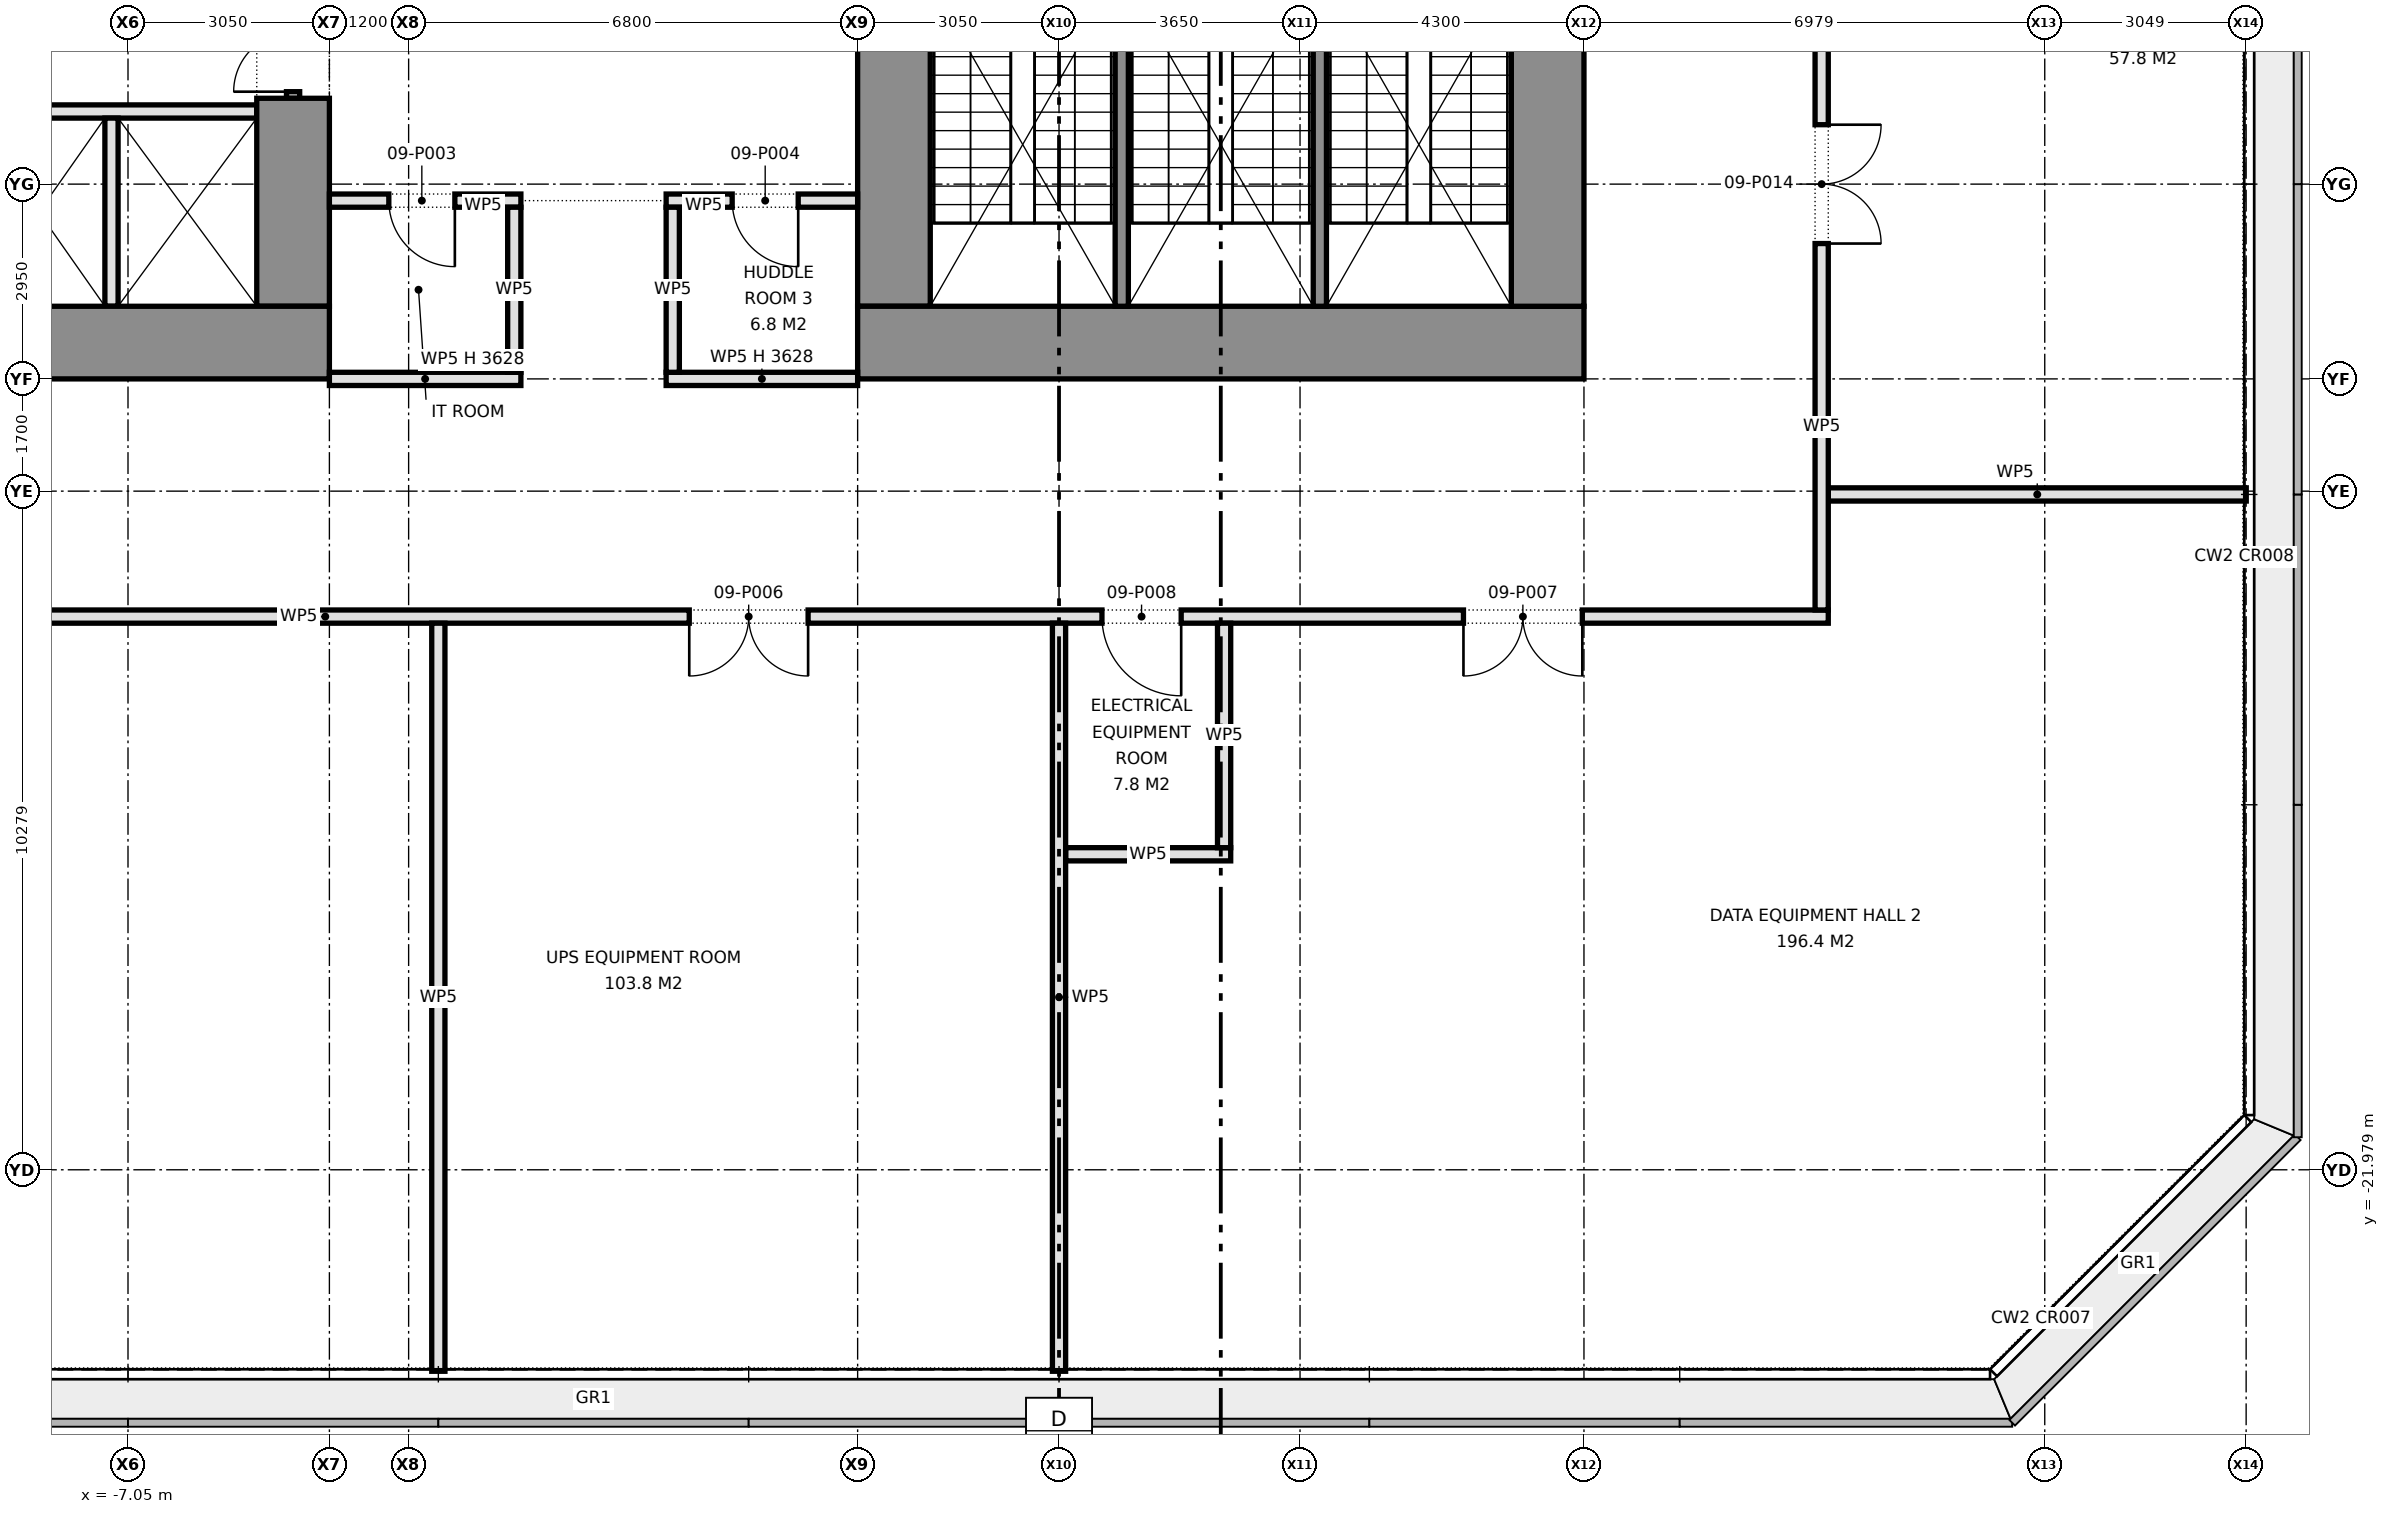
"""IFC4 building model, lengths in metres.
Left out: names, types, materials, properties, quantities, classifications, styles, units other than length and angle.
Written with IfcOpenShell. Run it as: python <this file> out.ifc"""

import sys

from ifc_helpers import new_model, si_unit, direction, frame, frame_2d, origin, place, context, subcontext, project, spatial, rectangle, extrude, element, fill, save


model = new_model("IFC4")
c1 = context("Model", 3, precision=1e-05, world=origin(), true_north=direction((0.0, 1.0)))
c2 = subcontext(c1, "Body", "Model", "MODEL_VIEW")
j1 = project(units=[si_unit("LENGTHUNIT", "METRE"), si_unit("PLANEANGLEUNIT", "RADIAN")], contexts=[c1])
p1 = place(None, origin())
s1 = spatial("IfcSite", under=j1, at=p1, CompositionType="ELEMENT")
p2 = place(p1, origin())
s2 = spatial("IfcBuilding", under=s1, at=p2, CompositionType="ELEMENT")
p3 = place(p2, frame((0.0, 0.0, 40.1)))
s3 = spatial("IfcBuildingStorey", under=s2, at=p3, CompositionType="ELEMENT", Elevation=40.1)
p4 = place(p3, frame((-15.0, -9.45, 0.0), z_axis=(0.0, 0.0, 1.0), x_axis=(1.0, 0.0, 0.0)))
e1 = element("IfcWall", 1, at=p4, inside=s3, PredefinedType="SHEAR", context=c2, shape_type="SweptSolid", body=[
    extrude(rectangle(XDim=11.0, YDim=1.1, at=frame_2d((5.5, 0.0))), origin(), (0.0, 0.0, 1.0), 4.575),
])
p5 = place(p3, frame((-4.55, -8.9, 0.0), z_axis=(0.0, 0.0, 1.0), x_axis=(0.0, 1.0, 0.0)))
e2 = element("IfcWall", 2, at=p5, inside=s3, PredefinedType="SHEAR", context=c2, shape_type="SweptSolid", body=[
    extrude(rectangle(XDim=3.15, YDim=1.1, at=frame_2d((1.575, 0.0))), origin(), (0.0, 0.0, 1.0), 4.575),
])
p6 = place(p3, frame((-4.55, -5.75, 0.0), z_axis=(0.0, 0.0, 1.0), x_axis=(0.0, 1.0, 0.0)))
e3 = element("IfcWall", 3, at=p6, inside=s3, PredefinedType="PARTITIONING", context=c2, shape_type="SweptSolid", body=[
    extrude(rectangle(XDim=2.0, YDim=0.2, at=frame_2d((1.0, 0.0))), origin(), (0.0, 0.0, 1.0), 2.4),
])
p7 = place(p6, frame((0.1, 0.0, 0.0)))
e4 = element("IfcOpeningElement", 4, at=p7, cuts=e3, PredefinedType="OPENING", context=c2, shape_type="SweptSolid", body=[
    extrude(rectangle(XDim=1.8, YDim=2.1, at=frame_2d((0.9, 1.05))), frame((0.0, 0.11, 0.0), z_axis=(0.0, -1.0, 0.0), x_axis=(1.0, 0.0, 0.0)), (0.0, 0.0, 1.0), 0.22),
])
p8 = place(p3, frame((-13.9, -5.95, 0.0), z_axis=(0.0, 0.0, 1.0), x_axis=(1.0, 0.0, 0.0)))
e5 = element("IfcWall", 5, at=p8, inside=s3, PredefinedType="PARTITIONING", context=c2, shape_type="SweptSolid", body=[
    extrude(rectangle(XDim=8.8, YDim=0.2, at=frame_2d((4.4, 0.0))), origin(), (0.0, 0.0, 1.0), 4.575),
])
p9 = place(p8, frame((1.7, 0.0, 0.0)))
e6 = element("IfcOpeningElement", 6, at=p9, cuts=e5, PredefinedType="OPENING", context=c2, shape_type="SweptSolid", body=[
    extrude(rectangle(XDim=0.9, YDim=2.1, at=frame_2d((0.45, 1.05))), frame((0.0, 0.11, 0.0), z_axis=(0.0, -1.0, 0.0), x_axis=(1.0, 0.0, 0.0)), (0.0, 0.0, 1.0), 0.22),
])
p10 = place(p3, frame((-7.3, -8.9, 0.0), z_axis=(0.0, 0.0, 1.0), x_axis=(0.0, 1.0, 0.0)))
e7 = element("IfcWall", 7, at=p10, inside=s3, PredefinedType="PARTITIONING", context=c2, shape_type="SweptSolid", body=[
    extrude(rectangle(XDim=2.85, YDim=0.2, at=frame_2d((1.425, 0.0))), origin(), (0.0, 0.0, 1.0), 4.575),
])
p11 = place(p3, frame((15.0, -9.45, 0.0), z_axis=(0.0, 0.0, 1.0), x_axis=(-1.0, 0.0, 0.0)))
e8 = element("IfcWall", 8, at=p11, inside=s3, PredefinedType="SHEAR", context=c2, shape_type="SweptSolid", body=[
    extrude(rectangle(XDim=11.0, YDim=1.1, at=frame_2d((5.5, 0.0))), origin(), (0.0, 0.0, 1.0), 4.575),
])
p12 = place(p3, frame((14.45, -3.68, 0.0), z_axis=(0.0, 0.0, 1.0), x_axis=(0.0, -1.0, 0.0)))
e9 = element("IfcWall", 9, at=p12, inside=s3, PredefinedType="SHEAR", context=c2, shape_type="SweptSolid", body=[
    extrude(rectangle(XDim=5.22, YDim=1.1, at=frame_2d((2.61, 0.0))), origin(), (0.0, 0.0, 1.0), 4.575),
])
p13 = place(p3, frame((4.55, -1.55, 0.0), z_axis=(0.0, 0.0, 1.0), x_axis=(0.0, -1.0, 0.0)))
e10 = element("IfcWall", 10, at=p13, inside=s3, PredefinedType="SHEAR", context=c2, shape_type="SweptSolid", body=[
    extrude(rectangle(XDim=7.35, YDim=1.1, at=frame_2d((3.675, 0.0))), origin(), (0.0, 0.0, 1.0), 4.575),
])
for number, where, z_axis, x_axis in (
    (11, (11.0, -2.38, 0.0), (0.0, 0.0, 1.0), (0.0, -1.0, 0.0)),
    (12, (8.0, -2.38, 0.0), (0.0, 0.0, 1.0), (0.0, -1.0, 0.0)),
):
    element("IfcWall", number, at=place(p3, frame(where, z_axis=z_axis, x_axis=x_axis)), inside=s3, PredefinedType="SHEAR", context=c2, shape_type="SweptSolid", body=[
        extrude(rectangle(XDim=6.52, YDim=0.2, at=frame_2d((3.26, 0.0))), origin(), (0.0, 0.0, 1.0), 4.575),
    ])
p14 = place(p3, frame((7.15, -17.2, 0.0), z_axis=(0.0, 0.0, 1.0), x_axis=(1.0, 0.0, 0.0)))
e13 = element("IfcWall", 13, at=p14, inside=s3, PredefinedType="PARTITIONING", context=c2, shape_type="SweptSolid", body=[
    extrude(rectangle(XDim=2.5, YDim=0.2, at=frame_2d((1.25, 0.0))), origin(), (0.0, 0.0, 1.0), 4.575),
])
p15 = place(p3, frame((-18.7, -13.6, 0.0), z_axis=(0.0, 0.0, 1.0), x_axis=(1.0, 0.0, 0.0)))
e14 = element("IfcWall", 14, at=p15, inside=s3, PredefinedType="PARTITIONING", context=c2, shape_type="SweptSolid", body=[
    extrude(rectangle(XDim=37.4, YDim=0.2, at=frame_2d((18.7, 0.0))), origin(), (0.0, 0.0, 1.0), 4.575),
])
p16 = place(p15, frame((7.325, 0.0, 0.0)))
e15 = element("IfcOpeningElement", 15, at=p16, cuts=e14, PredefinedType="OPENING", context=c2, shape_type="SweptSolid", body=[
    extrude(rectangle(XDim=1.8, YDim=2.1, at=frame_2d((0.9, 1.05))), frame((0.0, 0.11, 0.0), z_axis=(0.0, -1.0, 0.0), x_axis=(1.0, 0.0, 0.0)), (0.0, 0.0, 1.0), 0.22),
])
p17 = place(p15, frame((20.15, 0.0, 0.0)))
e16 = element("IfcOpeningElement", 16, at=p17, cuts=e14, PredefinedType="OPENING", context=c2, shape_type="SweptSolid", body=[
    extrude(rectangle(XDim=1.8, YDim=2.1, at=frame_2d((0.9, 1.05))), frame((0.0, 0.11, 0.0), z_axis=(0.0, -1.0, 0.0), x_axis=(1.0, 0.0, 0.0)), (0.0, 0.0, 1.0), 0.22),
])
p18 = place(p15, frame((31.875, 0.0, 0.0)))
e17 = element("IfcOpeningElement", 17, at=p18, cuts=e14, PredefinedType="OPENING", context=c2, shape_type="SweptSolid", body=[
    extrude(rectangle(XDim=1.8, YDim=2.1, at=frame_2d((0.9, 1.05))), frame((0.0, 0.11, 0.0), z_axis=(0.0, -1.0, 0.0), x_axis=(1.0, 0.0, 0.0)), (0.0, 0.0, 1.0), 0.22),
])
p19 = place(p15, frame((26.4, 0.0, 0.0)))
e18 = element("IfcOpeningElement", 18, at=p19, cuts=e14, PredefinedType="OPENING", context=c2, shape_type="SweptSolid", body=[
    extrude(rectangle(XDim=1.2, YDim=2.1, at=frame_2d((0.6, 1.05))), frame((0.0, 0.11, 0.0), z_axis=(0.0, -1.0, 0.0), x_axis=(1.0, 0.0, 0.0)), (0.0, 0.0, 1.0), 0.22),
])
p20 = place(p3, frame((18.7, -11.75, 0.0), z_axis=(0.0, 0.0, 1.0), x_axis=(1.0, 0.0, 0.0)))
e19 = element("IfcWall", 19, at=p20, inside=s3, PredefinedType="PARTITIONING", context=c2, shape_type="SweptSolid", body=[
    extrude(rectangle(XDim=6.33, YDim=0.2, at=frame_2d((3.165, 0.0))), origin(), (0.0, 0.0, 1.0), 4.575),
])
for number, where, z_axis, x_axis in (
    (20, (-4.0, -10.0, 0.0), (0.0, 0.0, 1.0), (1.0, 0.0, 0.0)),
    (21, (1.1, -10.0, 0.0), (0.0, 0.0, 1.0), (1.0, 0.0, 0.0)),
):
    element("IfcWall", number, at=place(p3, frame(where, z_axis=z_axis, x_axis=x_axis)), inside=s3, PredefinedType="PARTITIONING", context=c2, shape_type="SweptSolid", body=[
        extrude(rectangle(XDim=2.9, YDim=0.2, at=frame_2d((1.45, 0.0))), origin(), (0.0, 0.0, 1.0), 3.627),
    ])
p21 = place(p3, frame((-4.0, -7.3, 0.0), z_axis=(0.0, 0.0, 1.0), x_axis=(1.0, 0.0, 0.0)))
e22 = element("IfcWall", 22, at=p21, inside=s3, PredefinedType="PARTITIONING", context=c2, shape_type="SweptSolid", body=[
    extrude(rectangle(XDim=2.9, YDim=0.2, at=frame_2d((1.45, 0.0))), origin(), (0.0, 0.0, 1.0), 4.575),
])
p22 = place(p21, frame((0.9, 0.0, 0.0)))
e23 = element("IfcOpeningElement", 23, at=p22, cuts=e22, PredefinedType="OPENING", context=c2, shape_type="SweptSolid", body=[
    extrude(rectangle(XDim=1.0, YDim=2.1, at=frame_2d((0.5, 1.05))), frame((0.0, 0.11, 0.0), z_axis=(0.0, -1.0, 0.0), x_axis=(1.0, 0.0, 0.0)), (0.0, 0.0, 1.0), 0.22),
])
p23 = place(p3, frame((1.1, -7.3, 0.0), z_axis=(0.0, 0.0, 1.0), x_axis=(1.0, 0.0, 0.0)))
e24 = element("IfcWall", 24, at=p23, inside=s3, PredefinedType="PARTITIONING", context=c2, shape_type="SweptSolid", body=[
    extrude(rectangle(XDim=2.9, YDim=0.2, at=frame_2d((1.45, 0.0))), origin(), (0.0, 0.0, 1.0), 4.575),
])
p24 = place(p23, frame((1.0, 0.0, 0.0)))
e25 = element("IfcOpeningElement", 25, at=p24, cuts=e24, PredefinedType="OPENING", context=c2, shape_type="SweptSolid", body=[
    extrude(rectangle(XDim=1.0, YDim=2.1, at=frame_2d((0.5, 1.05))), frame((0.0, 0.11, 0.0), z_axis=(0.0, -1.0, 0.0), x_axis=(1.0, 0.0, 0.0)), (0.0, 0.0, 1.0), 0.22),
])
p25 = place(p3, frame((18.6, -13.5, 0.0), z_axis=(0.0, 0.0, 1.0), x_axis=(0.0, 1.0, 0.0)))
e26 = element("IfcWall", 26, at=p25, inside=s3, PredefinedType="PARTITIONING", context=c2, shape_type="SweptSolid", body=[
    extrude(rectangle(XDim=27.0, YDim=0.2, at=frame_2d((13.5, 0.0))), origin(), (0.0, 0.0, 1.0), 4.575),
])
p26 = place(p25, frame((5.55, 0.0, 0.0)))
e27 = element("IfcOpeningElement", 27, at=p26, cuts=e26, PredefinedType="OPENING", context=c2, shape_type="SweptSolid", body=[
    extrude(rectangle(XDim=1.8, YDim=2.1, at=frame_2d((0.9, 1.05))), frame((0.0, 0.11, 0.0), z_axis=(0.0, -1.0, 0.0), x_axis=(1.0, 0.0, 0.0)), (0.0, 0.0, 1.0), 0.22),
])
p27 = place(p25, frame((21.7, 0.0, 0.0)))
e28 = element("IfcOpeningElement", 28, at=p27, cuts=e26, PredefinedType="OPENING", context=c2, shape_type="SweptSolid", body=[
    extrude(rectangle(XDim=1.2, YDim=2.1, at=frame_2d((0.6, 1.05))), frame((0.0, 0.11, 0.0), z_axis=(0.0, -1.0, 0.0), x_axis=(1.0, 0.0, 0.0)), (0.0, 0.0, 1.0), 0.22),
])
p28 = place(p25, frame((12.15, 0.0, 0.0)))
e29 = element("IfcOpeningElement", 29, at=p28, cuts=e26, PredefinedType="OPENING", context=c2, shape_type="SweptSolid", body=[
    extrude(rectangle(XDim=1.0, YDim=2.1, at=frame_2d((0.5, 1.05))), frame((0.0, 0.11, 0.0), z_axis=(0.0, -1.0, 0.0), x_axis=(1.0, 0.0, 0.0)), (0.0, 0.0, 1.0), 0.22),
])
p29 = place(p25, frame((15.15, 0.0, 0.0)))
e30 = element("IfcOpeningElement", 30, at=p29, cuts=e26, PredefinedType="OPENING", context=c2, shape_type="SweptSolid", body=[
    extrude(rectangle(XDim=1.0, YDim=2.1, at=frame_2d((0.5, 1.05))), frame((0.0, 0.11, 0.0), z_axis=(0.0, -1.0, 0.0), x_axis=(1.0, 0.0, 0.0)), (0.0, 0.0, 1.0), 0.22),
])
p30 = place(p25, frame((17.75, 0.0, 0.0)))
e31 = element("IfcOpeningElement", 31, at=p30, cuts=e26, PredefinedType="OPENING", context=c2, shape_type="SweptSolid", body=[
    extrude(rectangle(XDim=1.0, YDim=2.1, at=frame_2d((0.5, 1.05))), frame((0.0, 0.11, 0.0), z_axis=(0.0, -1.0, 0.0), x_axis=(1.0, 0.0, 0.0)), (0.0, 0.0, 1.0), 0.22),
])
p31 = place(p3, frame((9.55, -17.1, 0.0), z_axis=(0.0, 0.0, 1.0), x_axis=(0.0, 1.0, 0.0)))
e32 = element("IfcWall", 32, at=p31, inside=s3, PredefinedType="PARTITIONING", context=c2, shape_type="SweptSolid", body=[
    extrude(rectangle(XDim=3.4, YDim=0.2, at=frame_2d((1.7, 0.0))), origin(), (0.0, 0.0, 1.0), 4.575),
])
p32 = place(p3, frame((7.05, -25.03, 0.0), z_axis=(0.0, 0.0, 1.0), x_axis=(0.0, 1.0, 0.0)))
e33 = element("IfcWall", 33, at=p32, inside=s3, PredefinedType="PARTITIONING", context=c2, shape_type="SweptSolid", body=[
    extrude(rectangle(XDim=11.33, YDim=0.2, at=frame_2d((5.665, 0.0))), origin(), (0.0, 0.0, 1.0), 4.575),
])
for number, where, z_axis, x_axis in (
    (34, (1.2, -9.9, 0.0), (0.0, 0.0, 1.0), (0.0, 1.0, 0.0)),
    (35, (-1.2, -9.9, 0.0), (0.0, 0.0, 1.0), (0.0, 1.0, 0.0)),
):
    element("IfcWall", number, at=place(p3, frame(where, z_axis=z_axis, x_axis=x_axis)), inside=s3, PredefinedType="PARTITIONING", context=c2, shape_type="SweptSolid", body=[
        extrude(rectangle(XDim=2.5, YDim=0.2, at=frame_2d((1.25, 0.0))), origin(), (0.0, 0.0, 1.0), 4.575),
    ])
p33 = place(p3, frame((-2.35, -25.03, 0.0), z_axis=(0.0, 0.0, 1.0), x_axis=(0.0, 1.0, 0.0)))
e36 = element("IfcWall", 36, at=p33, inside=s3, PredefinedType="PARTITIONING", context=c2, shape_type="SweptSolid", body=[
    extrude(rectangle(XDim=11.33, YDim=0.2, at=frame_2d((5.665, 0.0))), origin(), (0.0, 0.0, 1.0), 4.575),
])
p34 = place(p7, origin())
e37 = element("IfcDoor", 37, at=p34, inside=s3, OperationType="DOUBLE_DOOR_SINGLE_SWING", PredefinedType="DOOR", context=c2, shape_type="SweptSolid", body=[
    extrude(rectangle(XDim=1.8, YDim=2.1, at=frame_2d((0.9, 1.05))), frame((0.0, 0.025, 0.0), z_axis=(0.0, -1.0, 0.0), x_axis=(1.0, 0.0, 0.0)), (0.0, 0.0, 1.0), 0.05),
])
fill(e4, e37)
p35 = place(p22, frame((1.0, 0.0, 0.0), z_axis=(0.0, 0.0, 1.0), x_axis=(-1.0, 0.0, 0.0)))
e38 = element("IfcDoor", 38, at=p35, inside=s3, OperationType="SINGLE_SWING_LEFT", PredefinedType="DOOR", context=c2, shape_type="SweptSolid", body=[
    extrude(rectangle(XDim=1.0, YDim=2.1, at=frame_2d((0.5, 1.05))), frame((0.0, 0.025, 0.0), z_axis=(0.0, -1.0, 0.0), x_axis=(1.0, 0.0, 0.0)), (0.0, 0.0, 1.0), 0.05),
])
fill(e23, e38)
p36 = place(p24, frame((1.0, 0.0, 0.0), z_axis=(0.0, 0.0, 1.0), x_axis=(-1.0, 0.0, 0.0)))
e39 = element("IfcDoor", 39, at=p36, inside=s3, OperationType="SINGLE_SWING_LEFT", PredefinedType="DOOR", context=c2, shape_type="SweptSolid", body=[
    extrude(rectangle(XDim=1.0, YDim=2.1, at=frame_2d((0.5, 1.05))), frame((0.0, 0.025, 0.0), z_axis=(0.0, -1.0, 0.0), x_axis=(1.0, 0.0, 0.0)), (0.0, 0.0, 1.0), 0.05),
])
fill(e25, e39)
p37 = place(p17, frame((1.8, 0.0, 0.0), z_axis=(0.0, 0.0, 1.0), x_axis=(-1.0, 0.0, 0.0)))
e40 = element("IfcDoor", 40, at=p37, inside=s3, OperationType="DOUBLE_DOOR_SINGLE_SWING", PredefinedType="DOOR", context=c2, shape_type="SweptSolid", body=[
    extrude(rectangle(XDim=1.8, YDim=2.1, at=frame_2d((0.9, 1.05))), frame((0.0, 0.025, 0.0), z_axis=(0.0, -1.0, 0.0), x_axis=(1.0, 0.0, 0.0)), (0.0, 0.0, 1.0), 0.05),
])
fill(e16, e40)
p38 = place(p18, frame((1.8, 0.0, 0.0), z_axis=(0.0, 0.0, 1.0), x_axis=(-1.0, 0.0, 0.0)))
e41 = element("IfcDoor", 41, at=p38, inside=s3, OperationType="DOUBLE_DOOR_SINGLE_SWING", PredefinedType="DOOR", context=c2, shape_type="SweptSolid", body=[
    extrude(rectangle(XDim=1.8, YDim=2.1, at=frame_2d((0.9, 1.05))), frame((0.0, 0.025, 0.0), z_axis=(0.0, -1.0, 0.0), x_axis=(1.0, 0.0, 0.0)), (0.0, 0.0, 1.0), 0.05),
])
fill(e17, e41)
p39 = place(p19, frame((1.2, 0.0, 0.0), z_axis=(0.0, 0.0, 1.0), x_axis=(-1.0, 0.0, 0.0)))
e42 = element("IfcDoor", 42, at=p39, inside=s3, OperationType="SINGLE_SWING_LEFT", PredefinedType="DOOR", context=c2, shape_type="SweptSolid", body=[
    extrude(rectangle(XDim=1.2, YDim=2.1, at=frame_2d((0.6, 1.05))), frame((0.0, 0.025, 0.0), z_axis=(0.0, -1.0, 0.0), x_axis=(1.0, 0.0, 0.0)), (0.0, 0.0, 1.0), 0.05),
])
fill(e18, e42)
p40 = place(p26, frame((1.8, 0.0, 0.0), z_axis=(0.0, 0.0, 1.0), x_axis=(-1.0, 0.0, 0.0)))
e43 = element("IfcDoor", 43, at=p40, inside=s3, OperationType="DOUBLE_DOOR_SINGLE_SWING", PredefinedType="DOOR", context=c2, shape_type="SweptSolid", body=[
    extrude(rectangle(XDim=1.8, YDim=2.1, at=frame_2d((0.9, 1.05))), frame((0.0, 0.025, 0.0), z_axis=(0.0, -1.0, 0.0), x_axis=(1.0, 0.0, 0.0)), (0.0, 0.0, 1.0), 0.05),
])
fill(e27, e43)
save(model, sys.argv[1])
